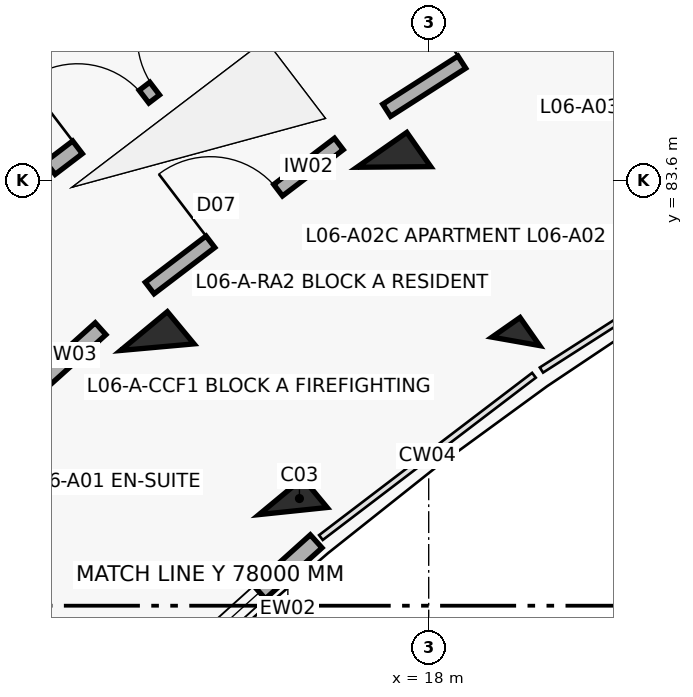
"""IFC4 building model, lengths in metres.
Left out: names, types, materials, properties, quantities, classifications, styles, units other than length and angle.
Written with IfcOpenShell. Run it as: python <this file> out.ifc"""

import sys

from ifc_helpers import new_model, si_unit, direction, frame, frame_2d, origin, origin_2d, place, context, subcontext, project, spatial, rectangle, extrude, element, fill, save


model = new_model("IFC4")
c1 = context("Model", 3, precision=1e-05, world=origin(), true_north=direction((0.0, 1.0)))
c2 = subcontext(c1, "Body", "Model", "MODEL_VIEW")
j1 = project(units=[si_unit("LENGTHUNIT", "METRE"), si_unit("PLANEANGLEUNIT", "RADIAN")], contexts=[c1])
p1 = place(None, origin())
s1 = spatial("IfcSite", under=j1, at=p1, CompositionType="ELEMENT")
p2 = place(p1, origin())
s2 = spatial("IfcBuilding", under=s1, at=p2, CompositionType="ELEMENT")
p3 = place(p2, frame((0.0, 0.0, 20.5)))
s3 = spatial("IfcBuildingStorey", under=s2, at=p3, CompositionType="ELEMENT", Elevation=20.5)
p4 = place(p3, frame((16.215, 79.245, 0.0), z_axis=(0.0, 0.0, 1.0), x_axis=(-0.637961754089, 0.770068049148, 0.0)))
e1 = element("IfcColumn", 1, at=p4, inside=s3, PredefinedType="COLUMN", context=c2, shape_type="SweptSolid", body=[
    extrude(rectangle(XDim=0.5, YDim=0.75, at=origin_2d()), origin(), (0.0, 0.0, 1.0), 3.1),
])
p5 = place(p3, frame((14.429, 81.402, 0.0), z_axis=(0.0, 0.0, 1.0), x_axis=(-0.637961754089, 0.770068049148, 0.0)))
e2 = element("IfcColumn", 2, at=p5, inside=s3, PredefinedType="COLUMN", context=c2, shape_type="SweptSolid", body=[
    extrude(rectangle(XDim=0.55, YDim=0.8, at=origin_2d()), origin(), (0.0, 0.0, 1.0), 3.1),
])
p6 = place(p3, frame((19.146, 81.478, 0.0), z_axis=(0.0, 0.0, 1.0), x_axis=(-0.573004420611, 0.819552276527, 0.0)))
e3 = element("IfcColumn", 3, at=p6, inside=s3, PredefinedType="COLUMN", context=c2, shape_type="SweptSolid", body=[
    extrude(rectangle(XDim=0.45, YDim=0.45, at=origin_2d()), origin(), (0.0, 0.0, 1.0), 3.1),
])
p7 = place(p3, frame((17.542, 83.773, 0.0), z_axis=(0.0, 0.0, 1.0), x_axis=(-0.573004420611, 0.819552276527, 0.0)))
e4 = element("IfcColumn", 4, at=p7, inside=s3, PredefinedType="COLUMN", context=c2, shape_type="SweptSolid", body=[
    extrude(rectangle(XDim=0.55, YDim=0.8, at=origin_2d()), origin(), (0.0, 0.0, 1.0), 3.1),
])
p8 = place(p3, frame((13.84, 76.437, 0.0), z_axis=(0.0, 0.0, 1.0), x_axis=(0.743385092197, 0.668863666751, 0.0)))
e5 = element("IfcWall", 5, at=p8, inside=s3, PredefinedType="SOLIDWALL", context=c2, shape_type="SweptSolid", body=[
    extrude(rectangle(XDim=3.604, YDim=0.23, at=frame_2d((1.802, 0.0))), origin(), (0.0, 0.0, 1.0), 2.25),
])
p9 = place(p8, frame((1.002, 0.0, 0.32)))
e6 = element("IfcOpeningElement", 6, at=p9, cuts=e5, PredefinedType="OPENING", context=c2, shape_type="SweptSolid", body=[
    extrude(rectangle(XDim=1.6, YDim=1.5, at=frame_2d((0.8, 0.75))), frame((0.0, 0.125, 0.0), z_axis=(0.0, -1.0, 0.0), x_axis=(1.0, 0.0, 0.0)), (0.0, 0.0, 1.0), 0.25),
])
p10 = place(p3, frame((11.357, 79.552, 0.0), z_axis=(0.0, 0.0, 1.0), x_axis=(0.743387266925, 0.668861249718, 0.0)))
e7 = element("IfcWall", 7, at=p10, inside=s3, PredefinedType="SOLIDWALL", context=c2, shape_type="SweptSolid", body=[
    extrude(rectangle(XDim=3.128, YDim=0.21, at=frame_2d((1.564, 0.0))), origin(), (0.0, 0.0, 1.0), 2.08),
])
p11 = place(p10, frame((1.014, 0.0, 0.0)))
e8 = element("IfcOpeningElement", 8, at=p11, cuts=e7, PredefinedType="OPENING", context=c2, shape_type="SweptSolid", body=[
    extrude(rectangle(XDim=1.1, YDim=2.15, at=frame_2d((0.55, 1.075))), frame((0.0, 0.115, 0.0), z_axis=(0.0, -1.0, 0.0), x_axis=(1.0, 0.0, 0.0)), (0.0, 0.0, 1.0), 0.23),
])
p12 = place(p3, frame((13.021, 83.759, 0.0), z_axis=(0.0, 0.0, 1.0), x_axis=(0.795498026433, 0.605956178235, 0.0)))
e9 = element("IfcWall", 9, at=p12, inside=s3, PredefinedType="SOLIDWALL", context=c2, shape_type="SweptSolid", body=[
    extrude(rectangle(XDim=3.296, YDim=0.21, at=frame_2d((1.648, 0.0))), origin(), (0.0, 0.0, 1.0), 2.08),
])
p13 = place(p12, frame((0.45, 0.0, 0.0)))
e10 = element("IfcOpeningElement", 10, at=p13, cuts=e9, PredefinedType="OPENING", context=c2, shape_type="SweptSolid", body=[
    extrude(rectangle(XDim=1.1, YDim=2.15, at=frame_2d((0.55, 1.075))), frame((0.0, 0.115, 0.0), z_axis=(0.0, -1.0, 0.0), x_axis=(1.0, 0.0, 0.0)), (0.0, 0.0, 1.0), 0.23),
])
p14 = place(p12, frame((1.726, 0.0, 0.0)))
e11 = element("IfcOpeningElement", 11, at=p14, cuts=e9, PredefinedType="OPENING", context=c2, shape_type="SweptSolid", body=[
    extrude(rectangle(XDim=1.12, YDim=2.15, at=frame_2d((0.56, 1.075))), frame((0.0, 0.115, 0.0), z_axis=(0.0, -1.0, 0.0), x_axis=(1.0, 0.0, 0.0)), (0.0, 0.0, 1.0), 0.23),
])
p15 = place(p3, frame((14.329, 82.18, 0.0), z_axis=(0.0, 0.0, 1.0), x_axis=(0.795501577908, 0.605951515838, 0.0)))
e12 = element("IfcWall", 12, at=p15, inside=s3, PredefinedType="SOLIDWALL", context=c2, shape_type="SweptSolid", body=[
    extrude(rectangle(XDim=3.129, YDim=0.19, at=frame_2d((1.564, 0.0))), origin(), (0.0, 0.0, 1.0), 2.08),
])
p16 = place(p15, frame((1.004, 0.0, 0.0)))
e13 = element("IfcOpeningElement", 13, at=p16, cuts=e12, PredefinedType="OPENING", context=c2, shape_type="SweptSolid", body=[
    extrude(rectangle(XDim=1.12, YDim=2.15, at=frame_2d((0.56, 1.075))), frame((0.0, 0.105, 0.0), z_axis=(0.0, -1.0, 0.0), x_axis=(1.0, 0.0, 0.0)), (0.0, 0.0, 1.0), 0.21),
])
p17 = place(p3, frame((17.447, 84.519, 0.0), z_axis=(0.0, 0.0, 1.0), x_axis=(0.842225276846, 0.539125758095, 0.0)))
e14 = element("IfcWall", 14, at=p17, inside=s3, PredefinedType="SOLIDWALL", context=c2, shape_type="SweptSolid", body=[
    extrude(rectangle(XDim=3.269, YDim=0.19, at=frame_2d((1.634, 0.0))), origin(), (0.0, 0.0, 1.0), 2.08),
])
p18 = place(p17, frame((1.174, 0.0, 0.0)))
e15 = element("IfcOpeningElement", 15, at=p18, cuts=e14, PredefinedType="OPENING", context=c2, shape_type="SweptSolid", body=[
    extrude(rectangle(XDim=0.92, YDim=2.1, at=frame_2d((0.46, 1.05))), frame((0.0, 0.105, 0.0), z_axis=(0.0, -1.0, 0.0), x_axis=(1.0, 0.0, 0.0)), (0.0, 0.0, 1.0), 0.21),
])
p19 = place(p9, origin())
e16 = element("IfcWindow", 16, at=p19, inside=s3, PartitioningType="DOUBLE_PANEL_VERTICAL", PredefinedType="WINDOW", context=c2, shape_type="SweptSolid", body=[
    extrude(rectangle(XDim=1.6, YDim=1.5, at=frame_2d((0.8, 0.75))), frame((0.0, 0.03, 0.0), z_axis=(0.0, -1.0, 0.0), x_axis=(1.0, 0.0, 0.0)), (0.0, 0.0, 1.0), 0.06),
])
fill(e6, e16)
p20 = place(p13, origin())
e17 = element("IfcDoor", 17, at=p20, inside=s3, OperationType="SINGLE_SWING_LEFT", PredefinedType="DOOR", context=c2, shape_type="SweptSolid", body=[
    extrude(rectangle(XDim=1.1, YDim=2.15, at=frame_2d((0.55, 1.075))), frame((0.0, 0.025, 0.0), z_axis=(0.0, -1.0, 0.0), x_axis=(1.0, 0.0, 0.0)), (0.0, 0.0, 1.0), 0.05),
])
fill(e10, e17)
p21 = place(p14, origin())
e18 = element("IfcDoor", 18, at=p21, inside=s3, OperationType="SINGLE_SWING_RIGHT", PredefinedType="DOOR", context=c2, shape_type="SweptSolid", body=[
    extrude(rectangle(XDim=1.12, YDim=2.15, at=frame_2d((0.56, 1.075))), frame((0.0, 0.025, 0.0), z_axis=(0.0, -1.0, 0.0), x_axis=(1.0, 0.0, 0.0)), (0.0, 0.0, 1.0), 0.05),
])
fill(e11, e18)
p22 = place(p16, origin())
e19 = element("IfcDoor", 19, at=p22, inside=s3, OperationType="SINGLE_SWING_LEFT", PredefinedType="DOOR", context=c2, shape_type="SweptSolid", body=[
    extrude(rectangle(XDim=1.12, YDim=2.15, at=frame_2d((0.56, 1.075))), frame((0.0, 0.025, 0.0), z_axis=(0.0, -1.0, 0.0), x_axis=(1.0, 0.0, 0.0)), (0.0, 0.0, 1.0), 0.05),
])
fill(e13, e19)
p23 = place(p18, origin())
e20 = element("IfcDoor", 20, at=p23, inside=s3, OperationType="SINGLE_SWING_LEFT", PredefinedType="DOOR", context=c2, shape_type="SweptSolid", body=[
    extrude(rectangle(XDim=0.92, YDim=2.1, at=frame_2d((0.46, 1.05))), frame((0.0, 0.025, 0.0), z_axis=(0.0, -1.0, 0.0), x_axis=(1.0, 0.0, 0.0)), (0.0, 0.0, 1.0), 0.05),
])
fill(e15, e20)
save(model, sys.argv[1])
